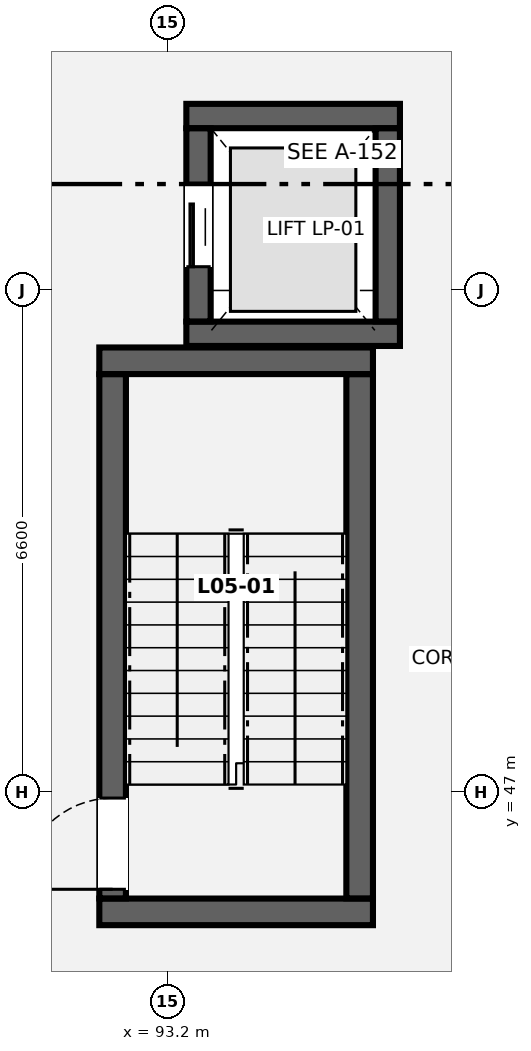
"""IFC4 building model, lengths in metres.
Left out: names, types, materials, properties, quantities, classifications, styles, units other than length and angle.
Written with IfcOpenShell. Run it as: python <this file> out.ifc"""

import sys

from ifc_helpers import new_model, si_unit, direction, frame, frame_2d, origin, place, context, subcontext, project, spatial, rectangle, extrude, element, fill, save


model = new_model("IFC4")
c1 = context("Model", 3, precision=1e-05, world=origin(), true_north=direction((0.0, 1.0)))
c2 = subcontext(c1, "Body", "Model", "MODEL_VIEW")
j1 = project(units=[si_unit("LENGTHUNIT", "METRE"), si_unit("PLANEANGLEUNIT", "RADIAN")], contexts=[c1])
p1 = place(None, origin())
s1 = spatial("IfcSite", under=j1, at=p1, CompositionType="ELEMENT")
p2 = place(p1, origin())
s2 = spatial("IfcBuilding", under=s1, at=p2, CompositionType="ELEMENT")
p3 = place(p2, frame((0.0, 0.0, 21.7)))
s3 = spatial("IfcBuildingStorey", under=s2, at=p3, CompositionType="ELEMENT", Elevation=21.7)
for number, where, z_axis, x_axis in (
    (1, (92.3, 45.425, 0.0), (0.0, 0.0, 1.0), (1.0, 0.0, 0.0)),
    (2, (92.3, 52.675, 0.0), (0.0, 0.0, 1.0), (1.0, 0.0, 0.0)),
):
    element("IfcWall", number, at=place(p3, frame(where, z_axis=z_axis, x_axis=x_axis)), inside=s3, PredefinedType="SHEAR", context=c2, shape_type="SweptSolid", body=[
        extrude(rectangle(XDim=3.6, YDim=0.35, at=frame_2d((1.8, 0.0))), origin(), (0.0, 0.0, 1.0), 3.98),
    ])
p4 = place(p3, frame((92.475, 45.602, 0.0), z_axis=(0.0, 0.0, 1.0), x_axis=(0.0, 1.0, 0.0)))
e3 = element("IfcWall", 3, at=p4, inside=s3, PredefinedType="SHEAR", context=c2, shape_type="SweptSolid", body=[
    extrude(rectangle(XDim=6.896, YDim=0.35, at=frame_2d((3.448, 0.0))), origin(), (0.0, 0.0, 1.0), 3.98),
])
p5 = place(p4, frame((0.12, 0.0, 0.0)))
e4 = element("IfcOpeningElement", 4, at=p5, cuts=e3, PredefinedType="OPENING", context=c2, shape_type="SweptSolid", body=[
    extrude(rectangle(XDim=1.2, YDim=2.15, at=frame_2d((0.6, 1.075))), frame((0.0, 0.185, 0.0), z_axis=(0.0, -1.0, 0.0), x_axis=(1.0, 0.0, 0.0)), (0.0, 0.0, 1.0), 0.37),
])
p6 = place(p3, frame((95.725, 45.602, 0.0), z_axis=(0.0, 0.0, 1.0), x_axis=(0.0, 1.0, 0.0)))
e5 = element("IfcWall", 5, at=p6, inside=s3, PredefinedType="SHEAR", context=c2, shape_type="SweptSolid", body=[
    extrude(rectangle(XDim=6.896, YDim=0.35, at=frame_2d((3.448, 0.0))), origin(), (0.0, 0.0, 1.0), 3.98),
])
for number, where, z_axis, x_axis in (
    (6, (93.445, 53.03, 0.0), (0.0, 0.0, 1.0), (1.0, 0.0, 0.0)),
    (7, (93.445, 55.895, 0.0), (0.0, 0.0, 1.0), (1.0, 0.0, 0.0)),
):
    element("IfcWall", number, at=place(p3, frame(where, z_axis=z_axis, x_axis=x_axis)), inside=s3, PredefinedType="SHEAR", context=c2, shape_type="SweptSolid", body=[
        extrude(rectangle(XDim=2.81, YDim=0.32, at=frame_2d((1.405, 0.0))), origin(), (0.0, 0.0, 1.0), 3.98),
    ])
p7 = place(p3, frame((93.605, 53.192, 0.0), z_axis=(0.0, 0.0, 1.0), x_axis=(0.0, 1.0, 0.0)))
e8 = element("IfcWall", 8, at=p7, inside=s3, PredefinedType="SHEAR", context=c2, shape_type="SweptSolid", body=[
    extrude(rectangle(XDim=2.541, YDim=0.32, at=frame_2d((1.271, 0.0))), origin(), (0.0, 0.0, 1.0), 3.98),
])
p8 = place(p7, frame((0.72, 0.0, 0.0)))
e9 = element("IfcOpeningElement", 9, at=p8, cuts=e8, PredefinedType="OPENING", context=c2, shape_type="SweptSolid", body=[
    extrude(rectangle(XDim=1.1, YDim=2.15, at=frame_2d((0.55, 1.075))), frame((0.0, 0.17, 0.0), z_axis=(0.0, -1.0, 0.0), x_axis=(1.0, 0.0, 0.0)), (0.0, 0.0, 1.0), 0.34),
])
p9 = place(p3, frame((96.095, 53.192, 0.0), z_axis=(0.0, 0.0, 1.0), x_axis=(0.0, 1.0, 0.0)))
e10 = element("IfcWall", 10, at=p9, inside=s3, PredefinedType="SHEAR", context=c2, shape_type="SweptSolid", body=[
    extrude(rectangle(XDim=2.541, YDim=0.32, at=frame_2d((1.271, 0.0))), origin(), (0.0, 0.0, 1.0), 3.98),
])
p10 = place(p5, origin())
e11 = element("IfcDoor", 11, at=p10, inside=s3, OperationType="SINGLE_SWING_LEFT", PredefinedType="DOOR", context=c2, shape_type="SweptSolid", body=[
    extrude(rectangle(XDim=1.2, YDim=2.15, at=frame_2d((0.6, 1.075))), frame((0.0, 0.025, 0.0), z_axis=(0.0, -1.0, 0.0), x_axis=(1.0, 0.0, 0.0)), (0.0, 0.0, 1.0), 0.05),
])
fill(e4, e11)
p11 = place(p8, origin())
e12 = element("IfcDoor", 12, at=p11, inside=s3, OperationType="SLIDING_TO_LEFT", PredefinedType="DOOR", context=c2, shape_type="SweptSolid", body=[
    extrude(rectangle(XDim=1.1, YDim=2.15, at=frame_2d((0.55, 1.075))), frame((0.0, 0.025, 0.0), z_axis=(0.0, -1.0, 0.0), x_axis=(1.0, 0.0, 0.0)), (0.0, 0.0, 1.0), 0.05),
])
fill(e9, e12)
save(model, sys.argv[1])
